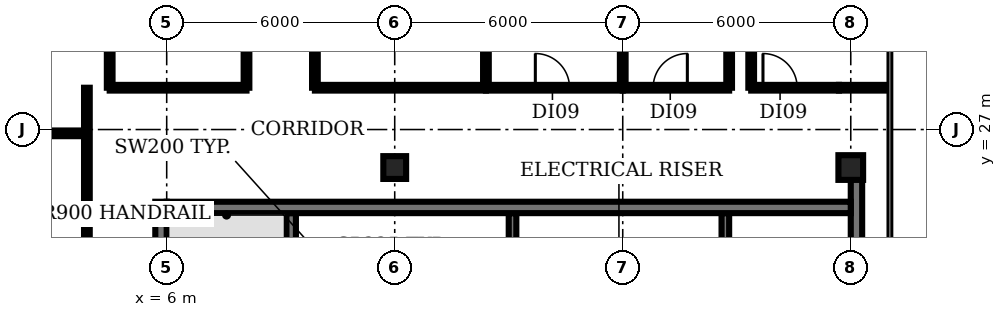
"""IFC4 building model, lengths in metres.
Left out: names, types, materials, properties, quantities, classifications, styles, units other than length and angle.
Written with IfcOpenShell. Run it as: python <this file> out.ifc"""

import sys

from ifc_helpers import new_model, si_unit, direction, frame, frame_2d, origin, origin_2d, place, context, subcontext, project, spatial, rectangle, extrude, element, fill, save


model = new_model("IFC4")
c1 = context("Model", 3, precision=1e-05, world=origin(), true_north=direction((0.0, 1.0)))
c2 = subcontext(c1, "Body", "Model", "MODEL_VIEW")
j1 = project(units=[si_unit("LENGTHUNIT", "METRE"), si_unit("PLANEANGLEUNIT", "RADIAN")], contexts=[c1])
p1 = place(None, origin())
s1 = spatial("IfcSite", under=j1, at=p1, CompositionType="ELEMENT")
p2 = place(p1, origin())
s2 = spatial("IfcBuilding", under=s1, at=p2, CompositionType="ELEMENT")
p3 = place(p2, frame((0.0, 0.0, 314.6)))
s3 = spatial("IfcBuildingStorey", under=s2, at=p3, CompositionType="ELEMENT", Elevation=314.6)
p4 = place(p3, frame((12.0, 26.0, 0.0), z_axis=(0.0, 0.0, 1.0), x_axis=(1.0, 0.0, 0.0)))
e1 = element("IfcColumn", 1, at=p4, inside=s3, PredefinedType="COLUMN", context=c2, shape_type="SweptSolid", body=[
    extrude(rectangle(XDim=0.6, YDim=0.6, at=origin_2d()), origin(), (0.0, 0.0, 1.0), 3.9),
])
p5 = place(p3, frame((24.0, 26.0, 0.0), z_axis=(0.0, 0.0, 1.0), x_axis=(1.0, 0.0, 0.0)))
e2 = element("IfcColumn", 2, at=p5, inside=s3, PredefinedType="COLUMN", context=c2, shape_type="SweptSolid", body=[
    extrude(rectangle(XDim=0.65, YDim=0.65, at=origin_2d()), origin(), (0.0, 0.0, 1.0), 3.9),
])
p6 = place(p3, frame((9.275, 18.375, 0.0), z_axis=(0.0, 0.0, 1.0), x_axis=(0.0, 1.0, 0.0)))
e3 = element("IfcWall", 3, at=p6, inside=s3, PredefinedType="SHEAR", context=c2, shape_type="SweptSolid", body=[
    extrude(rectangle(XDim=6.425, YDim=0.25, at=frame_2d((3.212, 0.0))), origin(), (0.0, 0.0, 1.0), 3.9),
])
for number, where, z_axis, x_axis in (
    (4, (15.1, 22.9, 0.0), (0.0, 0.0, 1.0), (0.0, 1.0, 0.0)),
    (5, (20.7, 22.9, 0.0), (0.0, 0.0, 1.0), (0.0, 1.0, 0.0)),
):
    element("IfcWall", number, at=place(p3, frame(where, z_axis=z_axis, x_axis=x_axis)), inside=s3, PredefinedType="SHEAR", context=c2, shape_type="SweptSolid", body=[
        extrude(rectangle(XDim=1.9, YDim=0.2, at=frame_2d((0.95, 0.0))), origin(), (0.0, 0.0, 1.0), 3.9),
    ])
p7 = place(p3, frame((5.85, 5.1, 0.0), z_axis=(0.0, 0.0, 1.0), x_axis=(0.0, 1.0, 0.0)))
e6 = element("IfcWall", 6, at=p7, inside=s3, PredefinedType="SHEAR", context=c2, shape_type="SweptSolid", body=[
    extrude(rectangle(XDim=20.0, YDim=0.3, at=frame_2d((10.0, 0.0))), origin(), (0.0, 0.0, 1.0), 3.9),
])
p8 = place(p7, frame((0.55, 0.0, 0.0)))
e7 = element("IfcOpeningElement", 7, at=p8, cuts=e6, PredefinedType="OPENING", context=c2, shape_type="SweptSolid", body=[
    extrude(rectangle(XDim=1.5, YDim=2.1, at=frame_2d((0.75, 1.05))), frame((0.0, 0.16, 0.0), z_axis=(0.0, -1.0, 0.0), x_axis=(1.0, 0.0, 0.0)), (0.0, 0.0, 1.0), 0.32),
])
p9 = place(p7, frame((7.0, 0.0, 0.0)))
e8 = element("IfcOpeningElement", 8, at=p9, cuts=e6, PredefinedType="OPENING", context=c2, shape_type="SweptSolid", body=[
    extrude(rectangle(XDim=1.2, YDim=2.1, at=frame_2d((0.6, 1.05))), frame((0.0, 0.16, 0.0), z_axis=(0.0, -1.0, 0.0), x_axis=(1.0, 0.0, 0.0)), (0.0, 0.0, 1.0), 0.32),
])
p10 = place(p7, frame((13.55, 0.0, 0.0)))
e9 = element("IfcOpeningElement", 9, at=p10, cuts=e6, PredefinedType="OPENING", context=c2, shape_type="SweptSolid", body=[
    extrude(rectangle(XDim=1.2, YDim=2.1, at=frame_2d((0.6, 1.05))), frame((0.0, 0.16, 0.0), z_axis=(0.0, -1.0, 0.0), x_axis=(1.0, 0.0, 0.0)), (0.0, 0.0, 1.0), 0.32),
])
p11 = place(p3, frame((24.15, 25.705, 0.0), z_axis=(0.0, 0.0, 1.0), x_axis=(0.0, -1.0, 0.0)))
e10 = element("IfcWall", 10, at=p11, inside=s3, PredefinedType="SHEAR", context=c2, shape_type="SweptSolid", body=[
    extrude(rectangle(XDim=20.605, YDim=0.3, at=frame_2d((10.302, 0.0))), origin(), (0.0, 0.0, 1.0), 3.9),
])
p12 = place(p11, frame((18.555, 0.0, 0.0)))
e11 = element("IfcOpeningElement", 11, at=p12, cuts=e10, PredefinedType="OPENING", context=c2, shape_type="SweptSolid", body=[
    extrude(rectangle(XDim=1.5, YDim=2.1, at=frame_2d((0.75, 1.05))), frame((0.0, 0.16, 0.0), z_axis=(0.0, -1.0, 0.0), x_axis=(1.0, 0.0, 0.0)), (0.0, 0.0, 1.0), 0.32),
])
p13 = place(p11, frame((12.455, 0.0, 0.0)))
e12 = element("IfcOpeningElement", 12, at=p13, cuts=e10, PredefinedType="OPENING", context=c2, shape_type="SweptSolid", body=[
    extrude(rectangle(XDim=0.9, YDim=2.1, at=frame_2d((0.45, 1.05))), frame((0.0, 0.16, 0.0), z_axis=(0.0, -1.0, 0.0), x_axis=(1.0, 0.0, 0.0)), (0.0, 0.0, 1.0), 0.32),
])
p14 = place(p11, frame((6.455, 0.0, 0.0)))
e13 = element("IfcOpeningElement", 13, at=p14, cuts=e10, PredefinedType="OPENING", context=c2, shape_type="SweptSolid", body=[
    extrude(rectangle(XDim=2.0, YDim=2.1, at=frame_2d((1.0, 1.05))), frame((0.0, 0.16, 0.0), z_axis=(0.0, -1.0, 0.0), x_axis=(1.0, 0.0, 0.0)), (0.0, 0.0, 1.0), 0.32),
])
p15 = place(p3, frame((6.0, 24.95, 0.0), z_axis=(0.0, 0.0, 1.0), x_axis=(1.0, 0.0, 0.0)))
e14 = element("IfcWall", 14, at=p15, inside=s3, PredefinedType="SHEAR", context=c2, shape_type="SweptSolid", body=[
    extrude(rectangle(XDim=18.0, YDim=0.3, at=frame_2d((9.0, 0.0))), origin(), (0.0, 0.0, 1.0), 3.9),
])
p16 = place(p3, frame((-0.98, 26.9, 0.0), z_axis=(0.0, 0.0, 1.0), x_axis=(1.0, 0.0, 0.0)))
e15 = element("IfcWall", 15, at=p16, inside=s3, PredefinedType="PARTITIONING", context=c2, shape_type="SweptSolid", body=[
    extrude(rectangle(XDim=4.88, YDim=0.15, at=frame_2d((2.44, 0.0))), origin(), (0.0, 0.0, 1.0), 2.95),
])
p17 = place(p3, frame((3.9, 22.5, 0.0), z_axis=(0.0, 0.0, 1.0), x_axis=(0.0, 1.0, 0.0)))
e16 = element("IfcWall", 16, at=p17, inside=s3, PredefinedType="PARTITIONING", context=c2, shape_type="SweptSolid", body=[
    extrude(rectangle(XDim=5.6, YDim=0.15, at=frame_2d((2.8, 0.0))), origin(), (0.0, 0.0, 1.0), 2.95),
])
p18 = place(p3, frame((4.5, 28.1, 0.0), z_axis=(0.0, 0.0, 1.0), x_axis=(0.0, 1.0, 0.0)))
e17 = element("IfcWall", 17, at=p18, inside=s3, PredefinedType="PARTITIONING", context=c2, shape_type="SweptSolid", body=[
    extrude(rectangle(XDim=4.8, YDim=0.15, at=frame_2d((2.4, 0.0))), origin(), (0.0, 0.0, 1.0), 2.95),
])
p19 = place(p3, frame((4.5, 28.1, 0.0), z_axis=(0.0, 0.0, 1.0), x_axis=(1.0, 0.0, 0.0)))
e18 = element("IfcWall", 18, at=p19, inside=s3, PredefinedType="PARTITIONING", context=c2, shape_type="SweptSolid", body=[
    extrude(rectangle(XDim=3.6, YDim=0.15, at=frame_2d((1.8, 0.0))), origin(), (0.0, 0.0, 1.0), 2.95),
])
p20 = place(p3, frame((8.1, 28.1, 0.0), z_axis=(0.0, 0.0, 1.0), x_axis=(0.0, 1.0, 0.0)))
e19 = element("IfcWall", 19, at=p20, inside=s3, PredefinedType="PARTITIONING", context=c2, shape_type="SweptSolid", body=[
    extrude(rectangle(XDim=4.8, YDim=0.15, at=frame_2d((2.4, 0.0))), origin(), (0.0, 0.0, 1.0), 2.95),
])
p21 = place(p20, frame((1.3, 0.0, 0.0)))
e20 = element("IfcOpeningElement", 20, at=p21, cuts=e19, PredefinedType="OPENING", context=c2, shape_type="SweptSolid", body=[
    extrude(rectangle(XDim=0.9, YDim=2.1, at=frame_2d((0.45, 1.05))), frame((0.0, 0.085, 0.0), z_axis=(0.0, -1.0, 0.0), x_axis=(1.0, 0.0, 0.0)), (0.0, 0.0, 1.0), 0.17),
])
p22 = place(p3, frame((9.9, 28.1, 0.0), z_axis=(0.0, 0.0, 1.0), x_axis=(0.0, 1.0, 0.0)))
e21 = element("IfcWall", 21, at=p22, inside=s3, PredefinedType="PARTITIONING", context=c2, shape_type="SweptSolid", body=[
    extrude(rectangle(XDim=4.8, YDim=0.15, at=frame_2d((2.4, 0.0))), origin(), (0.0, 0.0, 1.0), 2.95),
])
p23 = place(p3, frame((9.9, 28.1, 0.0), z_axis=(0.0, 0.0, 1.0), x_axis=(1.0, 0.0, 0.0)))
e22 = element("IfcWall", 22, at=p23, inside=s3, PredefinedType="PARTITIONING", context=c2, shape_type="SweptSolid", body=[
    extrude(rectangle(XDim=4.5, YDim=0.15, at=frame_2d((2.25, 0.0))), origin(), (0.0, 0.0, 1.0), 2.95),
])
p24 = place(p3, frame((14.4, 28.1, 0.0), z_axis=(0.0, 0.0, 1.0), x_axis=(0.0, 1.0, 0.0)))
e23 = element("IfcWall", 23, at=p24, inside=s3, PredefinedType="PARTITIONING", context=c2, shape_type="SweptSolid", body=[
    extrude(rectangle(XDim=4.8, YDim=0.15, at=frame_2d((2.4, 0.0))), origin(), (0.0, 0.0, 1.0), 2.95),
])
p25 = place(p3, frame((14.4, 28.1, 0.0), z_axis=(0.0, 0.0, 1.0), x_axis=(1.0, 0.0, 0.0)))
e24 = element("IfcWall", 24, at=p25, inside=s3, PredefinedType="PARTITIONING", context=c2, shape_type="SweptSolid", body=[
    extrude(rectangle(XDim=3.6, YDim=0.15, at=frame_2d((1.8, 0.0))), origin(), (0.0, 0.0, 1.0), 2.95),
])
p26 = place(p25, frame((1.3, 0.0, 0.0)))
e25 = element("IfcOpeningElement", 25, at=p26, cuts=e24, PredefinedType="OPENING", context=c2, shape_type="SweptSolid", body=[
    extrude(rectangle(XDim=0.9, YDim=2.1, at=frame_2d((0.45, 1.05))), frame((0.0, 0.085, 0.0), z_axis=(0.0, -1.0, 0.0), x_axis=(1.0, 0.0, 0.0)), (0.0, 0.0, 1.0), 0.17),
])
p27 = place(p3, frame((18.0, 28.1, 0.0), z_axis=(0.0, 0.0, 1.0), x_axis=(0.0, 1.0, 0.0)))
e26 = element("IfcWall", 26, at=p27, inside=s3, PredefinedType="PARTITIONING", context=c2, shape_type="SweptSolid", body=[
    extrude(rectangle(XDim=3.53, YDim=0.15, at=frame_2d((1.765, 0.0))), origin(), (0.0, 0.0, 1.0), 2.95),
])
p28 = place(p3, frame((18.0, 28.1, 0.0), z_axis=(0.0, 0.0, 1.0), x_axis=(1.0, 0.0, 0.0)))
e27 = element("IfcWall", 27, at=p28, inside=s3, PredefinedType="PARTITIONING", context=c2, shape_type="SweptSolid", body=[
    extrude(rectangle(XDim=2.8, YDim=0.15, at=frame_2d((1.4, 0.0))), origin(), (0.0, 0.0, 1.0), 2.95),
])
p29 = place(p28, frame((0.8, 0.0, 0.0)))
e28 = element("IfcOpeningElement", 28, at=p29, cuts=e27, PredefinedType="OPENING", context=c2, shape_type="SweptSolid", body=[
    extrude(rectangle(XDim=0.9, YDim=2.1, at=frame_2d((0.45, 1.05))), frame((0.0, 0.085, 0.0), z_axis=(0.0, -1.0, 0.0), x_axis=(1.0, 0.0, 0.0)), (0.0, 0.0, 1.0), 0.17),
])
for number, where, z_axis, x_axis in (
    (29, (20.8, 28.1, 0.0), (0.0, 0.0, 1.0), (0.0, 1.0, 0.0)),
    (30, (21.38, 28.1, 0.0), (0.0, 0.0, 1.0), (0.0, 1.0, 0.0)),
):
    element("IfcWall", number, at=place(p3, frame(where, z_axis=z_axis, x_axis=x_axis)), inside=s3, PredefinedType="PARTITIONING", context=c2, shape_type="SweptSolid", body=[
        extrude(rectangle(XDim=4.8, YDim=0.15, at=frame_2d((2.4, 0.0))), origin(), (0.0, 0.0, 1.0), 2.95),
    ])
p30 = place(p3, frame((21.38, 28.1, 0.0), z_axis=(0.0, 0.0, 1.0), x_axis=(1.0, 0.0, 0.0)))
e31 = element("IfcWall", 31, at=p30, inside=s3, PredefinedType="PARTITIONING", context=c2, shape_type="SweptSolid", body=[
    extrude(rectangle(XDim=2.31, YDim=0.15, at=frame_2d((1.155, 0.0))), origin(), (0.0, 0.0, 1.0), 2.95),
])
p31 = place(p30, frame((0.31, 0.0, 0.0)))
e32 = element("IfcOpeningElement", 32, at=p31, cuts=e31, PredefinedType="OPENING", context=c2, shape_type="SweptSolid", body=[
    extrude(rectangle(XDim=0.9, YDim=2.1, at=frame_2d((0.45, 1.05))), frame((0.0, 0.085, 0.0), z_axis=(0.0, -1.0, 0.0), x_axis=(1.0, 0.0, 0.0)), (0.0, 0.0, 1.0), 0.17),
])
p32 = place(p3, frame((23.69, 28.1, 0.0), z_axis=(0.0, 0.0, 1.0), x_axis=(1.0, 0.0, 0.0)))
e33 = element("IfcWall", 33, at=p32, inside=s3, PredefinedType="PARTITIONING", context=c2, shape_type="SweptSolid", body=[
    extrude(rectangle(XDim=1.29, YDim=0.15, at=frame_2d((0.645, 0.0))), origin(), (0.0, 0.0, 1.0), 2.95),
])
p33 = place(p26, origin())
e34 = element("IfcDoor", 34, at=p33, inside=s3, OperationType="SINGLE_SWING_LEFT", PredefinedType="DOOR", context=c2, shape_type="SweptSolid", body=[
    extrude(rectangle(XDim=0.9, YDim=2.1, at=frame_2d((0.45, 1.05))), frame((0.0, 0.025, 0.0), z_axis=(0.0, -1.0, 0.0), x_axis=(1.0, 0.0, 0.0)), (0.0, 0.0, 1.0), 0.05),
])
fill(e25, e34)
p34 = place(p29, origin())
e35 = element("IfcDoor", 35, at=p34, inside=s3, OperationType="SINGLE_SWING_RIGHT", PredefinedType="DOOR", context=c2, shape_type="SweptSolid", body=[
    extrude(rectangle(XDim=0.9, YDim=2.1, at=frame_2d((0.45, 1.05))), frame((0.0, 0.025, 0.0), z_axis=(0.0, -1.0, 0.0), x_axis=(1.0, 0.0, 0.0)), (0.0, 0.0, 1.0), 0.05),
])
fill(e28, e35)
p35 = place(p31, origin())
e36 = element("IfcDoor", 36, at=p35, inside=s3, OperationType="SINGLE_SWING_LEFT", PredefinedType="DOOR", context=c2, shape_type="SweptSolid", body=[
    extrude(rectangle(XDim=0.9, YDim=2.1, at=frame_2d((0.45, 1.05))), frame((0.0, 0.025, 0.0), z_axis=(0.0, -1.0, 0.0), x_axis=(1.0, 0.0, 0.0)), (0.0, 0.0, 1.0), 0.05),
])
fill(e32, e36)
save(model, sys.argv[1])
